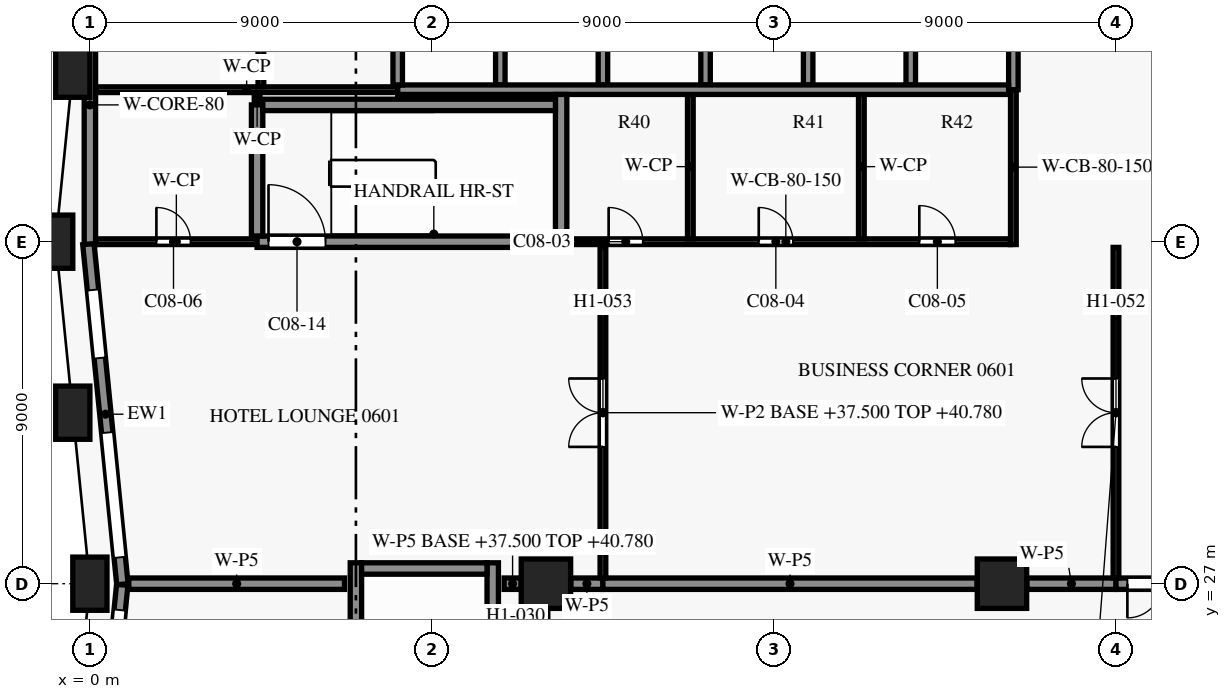
"""IFC4 building model, lengths in metres.
Left out: names, types, materials, properties, quantities, classifications, styles, units other than length and angle.
Written with IfcOpenShell. Run it as: python <this file> out.ifc"""

import sys

from ifc_helpers import new_model, si_unit, direction, frame, frame_2d, origin, origin_2d, place, context, subcontext, project, spatial, rectangle, extrude, element, fill, save


model = new_model("IFC4")
c1 = context("Model", 3, precision=1e-05, world=origin(), true_north=direction((0.0, 1.0)))
c2 = subcontext(c1, "Body", "Model", "MODEL_VIEW")
j1 = project(units=[si_unit("LENGTHUNIT", "METRE"), si_unit("PLANEANGLEUNIT", "RADIAN")], contexts=[c1])
p1 = place(None, origin())
s1 = spatial("IfcSite", under=j1, at=p1, CompositionType="ELEMENT")
p2 = place(p1, origin())
s2 = spatial("IfcBuilding", under=s1, at=p2, CompositionType="ELEMENT")
p3 = place(p2, frame((0.0, 0.0, 37.5)))
s3 = spatial("IfcBuildingStorey", under=s2, at=p3, CompositionType="ELEMENT", Elevation=37.5)
for number, where, z_axis, x_axis in (
    (1, (-0.45, 40.5, 0.0), (0.0, 0.0, 1.0), (-0.1, -0.995, 0.0)),
    (2, (-0.9, 36.0, 0.0), (0.0, 0.0, 1.0), (0.0, -1.0, 0.0)),
    (3, (-0.45, 31.5, 0.0), (0.0, 0.0, 1.0), (0.1, -0.995, 0.0)),
    (4, (0.0, 27.0, 0.0), (0.0, 0.0, 1.0), (0.0, -1.0, 0.0)),
):
    element("IfcColumn", number, at=place(p3, frame(where, z_axis=z_axis, x_axis=x_axis)), inside=s3, PredefinedType="COLUMN", context=c2, shape_type="SweptSolid", body=[
        extrude(rectangle(XDim=0.9, YDim=1.4, at=origin_2d()), origin(), (0.0, 0.0, 1.0), 3.6),
    ])
for number, where, z_axis, x_axis in (
    (5, (12.0, 27.0, 0.0), (0.0, 0.0, 1.0), (1.0, 0.0, 0.0)),
    (6, (24.0, 27.0, 0.0), (0.0, 0.0, 1.0), (1.0, 0.0, 0.0)),
):
    element("IfcColumn", number, at=place(p3, frame(where, z_axis=z_axis, x_axis=x_axis)), inside=s3, PredefinedType="COLUMN", context=c2, shape_type="SweptSolid", body=[
        extrude(rectangle(XDim=1.3, YDim=1.3, at=origin_2d()), origin(), (0.0, 0.0, 1.0), 3.6),
    ])
p4 = place(p3, frame((0.856, 26.985, 0.0), z_axis=(0.0, 0.0, 1.0), x_axis=(-0.099503719021, 0.99503719021, 0.0)))
e7 = element("IfcWall", 7, at=p4, inside=s3, PredefinedType="SOLIDWALL", context=c2, shape_type="SweptSolid", body=[
    extrude(rectangle(XDim=8.995, YDim=0.3, at=frame_2d((4.498, 0.0))), origin(), (0.0, 0.0, 1.0), 2.95),
])
p5 = place(p4, frame((0.711, 0.0, 0.15)))
e8 = element("IfcOpeningElement", 8, at=p5, cuts=e7, PredefinedType="OPENING", context=c2, shape_type="SweptSolid", body=[
    extrude(rectangle(XDim=3.3, YDim=2.4, at=frame_2d((1.65, 1.2))), frame((0.0, 0.16, 0.0), z_axis=(0.0, -1.0, 0.0), x_axis=(1.0, 0.0, 0.0)), (0.0, 0.0, 1.0), 0.32),
])
p6 = place(p4, frame((5.984, 0.0, 0.75)))
e9 = element("IfcOpeningElement", 9, at=p6, cuts=e7, PredefinedType="OPENING", context=c2, shape_type="SweptSolid", body=[
    extrude(rectangle(XDim=1.8, YDim=1.8, at=frame_2d((0.9, 0.9))), frame((0.0, 0.16, 0.0), z_axis=(0.0, -1.0, 0.0), x_axis=(1.0, 0.0, 0.0)), (0.0, 0.0, 1.0), 0.32),
])
p7 = place(p3, frame((-0.047, 17.985, 0.0), z_axis=(0.0, 0.0, 1.0), x_axis=(0.099522457379, 0.995035316196, 0.0)))
e10 = element("IfcWall", 10, at=p7, inside=s3, PredefinedType="SOLIDWALL", context=c2, shape_type="SweptSolid", body=[
    extrude(rectangle(XDim=9.03, YDim=0.3, at=frame_2d((4.515, 0.0))), origin(), (0.0, 0.0, 1.0), 2.95),
])
p8 = place(p7, frame((1.291, 0.0, 0.75)))
e11 = element("IfcOpeningElement", 11, at=p8, cuts=e10, PredefinedType="OPENING", context=c2, shape_type="SweptSolid", body=[
    extrude(rectangle(XDim=1.8, YDim=1.8, at=frame_2d((0.9, 0.9))), frame((0.0, 0.16, 0.0), z_axis=(0.0, -1.0, 0.0), x_axis=(1.0, 0.0, 0.0)), (0.0, 0.0, 1.0), 0.32),
])
p9 = place(p7, frame((5.064, 0.0, 0.15)))
e12 = element("IfcOpeningElement", 12, at=p9, cuts=e10, PredefinedType="OPENING", context=c2, shape_type="SweptSolid", body=[
    extrude(rectangle(XDim=3.3, YDim=2.4, at=frame_2d((1.65, 1.2))), frame((0.0, 0.16, 0.0), z_axis=(0.0, -1.0, 0.0), x_axis=(1.0, 0.0, 0.0)), (0.0, 0.0, 1.0), 0.32),
])
p10 = place(p3, frame((7.15, 27.4, 0.0), z_axis=(0.0, 0.0, 1.0), x_axis=(1.0, 0.0, 0.0)))
e13 = element("IfcWall", 13, at=p10, inside=s3, PredefinedType="SHEAR", context=c2, shape_type="SweptSolid", body=[
    extrude(rectangle(XDim=3.3, YDim=0.3, at=frame_2d((1.65, 0.0))), origin(), (0.0, 0.0, 1.0), 3.3),
])
p11 = place(p3, frame((0.15, 36.0, 0.0), z_axis=(0.0, 0.0, 1.0), x_axis=(1.0, 0.0, 0.0)))
e14 = element("IfcWall", 14, at=p11, inside=s3, PredefinedType="PARTITIONING", context=c2, shape_type="SweptSolid", body=[
    extrude(rectangle(XDim=4.25, YDim=0.15, at=frame_2d((2.125, 0.0))), origin(), (0.0, 0.0, 1.0), 3.3),
])
p12 = place(p11, frame((1.6, 0.0, 0.0)))
e15 = element("IfcOpeningElement", 15, at=p12, cuts=e14, PredefinedType="OPENING", context=c2, shape_type="SweptSolid", body=[
    extrude(rectangle(XDim=0.9, YDim=2.1, at=frame_2d((0.45, 1.05))), frame((0.0, 0.085, 0.0), z_axis=(0.0, -1.0, 0.0), x_axis=(1.0, 0.0, 0.0)), (0.0, 0.0, 1.0), 0.17),
])
p13 = place(p3, frame((12.4, 36.0, 0.0), z_axis=(0.0, 0.0, 1.0), x_axis=(1.0, 0.0, 0.0)))
e16 = element("IfcWall", 16, at=p13, inside=s3, PredefinedType="SHEAR", context=c2, shape_type="SweptSolid", body=[
    extrude(rectangle(XDim=11.825, YDim=0.15, at=frame_2d((5.913, 0.0))), origin(), (0.0, 0.0, 1.0), 3.3),
])
p14 = place(p13, frame((1.25, 0.0, 0.0)))
e17 = element("IfcOpeningElement", 17, at=p14, cuts=e16, PredefinedType="OPENING", context=c2, shape_type="SweptSolid", body=[
    extrude(rectangle(XDim=0.9, YDim=2.1, at=frame_2d((0.45, 1.05))), frame((0.0, 0.085, 0.0), z_axis=(0.0, -1.0, 0.0), x_axis=(1.0, 0.0, 0.0)), (0.0, 0.0, 1.0), 0.17),
])
p15 = place(p13, frame((5.2, 0.0, 0.0)))
e18 = element("IfcOpeningElement", 18, at=p15, cuts=e16, PredefinedType="OPENING", context=c2, shape_type="SweptSolid", body=[
    extrude(rectangle(XDim=0.9, YDim=2.1, at=frame_2d((0.45, 1.05))), frame((0.0, 0.085, 0.0), z_axis=(0.0, -1.0, 0.0), x_axis=(1.0, 0.0, 0.0)), (0.0, 0.0, 1.0), 0.17),
])
p16 = place(p13, frame((9.425, 0.0, 0.0)))
e19 = element("IfcOpeningElement", 19, at=p16, cuts=e16, PredefinedType="OPENING", context=c2, shape_type="SweptSolid", body=[
    extrude(rectangle(XDim=0.95, YDim=2.1, at=frame_2d((0.475, 1.05))), frame((0.0, 0.085, 0.0), z_axis=(0.0, -1.0, 0.0), x_axis=(1.0, 0.0, 0.0)), (0.0, 0.0, 1.0), 0.17),
])
p17 = place(p3, frame((4.4, 36.0, 0.0), z_axis=(0.0, 0.0, 1.0), x_axis=(1.0, 0.0, 0.0)))
e20 = element("IfcWall", 20, at=p17, inside=s3, PredefinedType="SHEAR", context=c2, shape_type="SweptSolid", body=[
    extrude(rectangle(XDim=8.0, YDim=0.3, at=frame_2d((4.0, 0.0))), origin(), (0.0, 0.0, 1.0), 3.3),
])
p18 = place(p17, frame((0.3, 0.0, 0.0)))
e21 = element("IfcOpeningElement", 21, at=p18, cuts=e20, PredefinedType="OPENING", context=c2, shape_type="SweptSolid", body=[
    extrude(rectangle(XDim=1.5, YDim=2.2, at=frame_2d((0.75, 1.1))), frame((0.0, 0.16, 0.0), z_axis=(0.0, -1.0, 0.0), x_axis=(1.0, 0.0, 0.0)), (0.0, 0.0, 1.0), 0.32),
])
p19 = place(p3, frame((4.55, 39.6, 0.0), z_axis=(0.0, 0.0, 1.0), x_axis=(1.0, 0.0, 0.0)))
e22 = element("IfcWall", 22, at=p19, inside=s3, PredefinedType="SHEAR", context=c2, shape_type="SweptSolid", body=[
    extrude(rectangle(XDim=7.7, YDim=0.3, at=frame_2d((3.85, 0.0))), origin(), (0.0, 0.0, 1.0), 3.3),
])
p20 = place(p3, frame((0.15, 40.0, 0.0), z_axis=(0.0, 0.0, 1.0), x_axis=(1.0, 0.0, 0.0)))
e23 = element("IfcWall", 23, at=p20, inside=s3, PredefinedType="PARTITIONING", context=c2, shape_type="SweptSolid", body=[
    extrude(rectangle(XDim=7.95, YDim=0.15, at=frame_2d((3.975, 0.0))), origin(), (0.0, 0.0, 1.0), 3.3),
])
p21 = place(p3, frame((8.1, 40.0, 0.0), z_axis=(0.0, 0.0, 1.0), x_axis=(1.0, 0.0, 0.0)))
e24 = element("IfcWall", 24, at=p21, inside=s3, PredefinedType="SHEAR", context=c2, shape_type="SweptSolid", body=[
    extrude(rectangle(XDim=16.075, YDim=0.25, at=frame_2d((8.038, 0.0))), origin(), (0.0, 0.0, 1.0), 3.3),
])
p22 = place(p3, frame((0.0, 35.925, 0.0), z_axis=(0.0, 0.0, 1.0), x_axis=(0.0, 1.0, 0.0)))
e25 = element("IfcWall", 25, at=p22, inside=s3, PredefinedType="SHEAR", context=c2, shape_type="SweptSolid", body=[
    extrude(rectangle(XDim=7.35, YDim=0.3, at=frame_2d((3.675, 0.0))), origin(), (0.0, 0.0, 1.0), 3.3),
])
p23 = place(p3, frame((4.4, 39.6, 0.0), z_axis=(0.0, 0.0, 1.0), x_axis=(0.0, 1.0, 0.0)))
e26 = element("IfcWall", 26, at=p23, inside=s3, PredefinedType="PARTITIONING", context=c2, shape_type="SweptSolid", body=[
    extrude(rectangle(XDim=0.325, YDim=0.15, at=frame_2d((0.163, 0.0))), origin(), (0.0, 0.0, 1.0), 3.3),
])
p24 = place(p3, frame((4.4, 36.15, 0.0), z_axis=(0.0, 0.0, 1.0), x_axis=(0.0, 1.0, 0.0)))
e27 = element("IfcWall", 27, at=p24, inside=s3, PredefinedType="SHEAR", context=c2, shape_type="SweptSolid", body=[
    extrude(rectangle(XDim=3.45, YDim=0.3, at=frame_2d((1.725, 0.0))), origin(), (0.0, 0.0, 1.0), 3.3),
])
p25 = place(p3, frame((4.5, 40.075, 0.0), z_axis=(0.0, 0.0, 1.0), x_axis=(0.0, 1.0, 0.0)))
e28 = element("IfcWall", 28, at=p25, inside=s3, PredefinedType="PARTITIONING", context=c2, shape_type="SweptSolid", body=[
    extrude(rectangle(XDim=3.05, YDim=0.15, at=frame_2d((1.525, 0.0))), origin(), (0.0, 0.0, 1.0), 3.3),
])
p26 = place(p3, frame((7.0, 19.25, 0.0), z_axis=(0.0, 0.0, 1.0), x_axis=(0.0, 1.0, 0.0)))
e29 = element("IfcWall", 29, at=p26, inside=s3, PredefinedType="SHEAR", context=c2, shape_type="SweptSolid", body=[
    extrude(rectangle(XDim=8.3, YDim=0.3, at=frame_2d((4.15, 0.0))), origin(), (0.0, 0.0, 1.0), 3.3),
])
p27 = place(p3, frame((8.1, 40.125, 0.0), z_axis=(0.0, 0.0, 1.0), x_axis=(0.0, 1.0, 0.0)))
e30 = element("IfcWall", 30, at=p27, inside=s3, PredefinedType="SHEAR", context=c2, shape_type="SweptSolid", body=[
    extrude(rectangle(XDim=2.95, YDim=0.25, at=frame_2d((1.475, 0.0))), origin(), (0.0, 0.0, 1.0), 3.3),
])
p28 = place(p3, frame((10.6, 19.25, 0.0), z_axis=(0.0, 0.0, 1.0), x_axis=(0.0, 1.0, 0.0)))
e31 = element("IfcWall", 31, at=p28, inside=s3, PredefinedType="SHEAR", context=c2, shape_type="SweptSolid", body=[
    extrude(rectangle(XDim=8.3, YDim=0.3, at=frame_2d((4.15, 0.0))), origin(), (0.0, 0.0, 1.0), 3.3),
])
p29 = place(p28, frame((0.55, 0.0, 0.0)))
e32 = element("IfcOpeningElement", 32, at=p29, cuts=e31, PredefinedType="OPENING", context=c2, shape_type="SweptSolid", body=[
    extrude(rectangle(XDim=1.2, YDim=2.2, at=frame_2d((0.6, 1.1))), frame((0.0, 0.16, 0.0), z_axis=(0.0, -1.0, 0.0), x_axis=(1.0, 0.0, 0.0)), (0.0, 0.0, 1.0), 0.32),
])
p30 = place(p3, frame((10.8, 40.125, 0.0), z_axis=(0.0, 0.0, 1.0), x_axis=(0.0, 1.0, 0.0)))
e33 = element("IfcWall", 33, at=p30, inside=s3, PredefinedType="SHEAR", context=c2, shape_type="SweptSolid", body=[
    extrude(rectangle(XDim=2.95, YDim=0.25, at=frame_2d((1.475, 0.0))), origin(), (0.0, 0.0, 1.0), 3.3),
])
p31 = place(p3, frame((12.4, 36.15, 0.0), z_axis=(0.0, 0.0, 1.0), x_axis=(0.0, 1.0, 0.0)))
e34 = element("IfcWall", 34, at=p31, inside=s3, PredefinedType="SHEAR", context=c2, shape_type="SweptSolid", body=[
    extrude(rectangle(XDim=3.725, YDim=0.3, at=frame_2d((1.863, 0.0))), origin(), (0.0, 0.0, 1.0), 3.3),
])
p32 = place(p3, frame((13.5, 40.125, 0.0), z_axis=(0.0, 0.0, 1.0), x_axis=(0.0, 1.0, 0.0)))
e35 = element("IfcWall", 35, at=p32, inside=s3, PredefinedType="SHEAR", context=c2, shape_type="SweptSolid", body=[
    extrude(rectangle(XDim=2.95, YDim=0.25, at=frame_2d((1.475, 0.0))), origin(), (0.0, 0.0, 1.0), 3.3),
])
p33 = place(p3, frame((15.8, 36.075, 0.0), z_axis=(0.0, 0.0, 1.0), x_axis=(0.0, 1.0, 0.0)))
e36 = element("IfcWall", 36, at=p33, inside=s3, PredefinedType="PARTITIONING", context=c2, shape_type="SweptSolid", body=[
    extrude(rectangle(XDim=3.8, YDim=0.15, at=frame_2d((1.9, 0.0))), origin(), (0.0, 0.0, 1.0), 3.3),
])
for number, where, z_axis, x_axis in (
    (37, (16.2, 40.125, 0.0), (0.0, 0.0, 1.0), (0.0, 1.0, 0.0)),
    (38, (18.9, 40.125, 0.0), (0.0, 0.0, 1.0), (0.0, 1.0, 0.0)),
):
    element("IfcWall", number, at=place(p3, frame(where, z_axis=z_axis, x_axis=x_axis)), inside=s3, PredefinedType="SHEAR", context=c2, shape_type="SweptSolid", body=[
        extrude(rectangle(XDim=2.95, YDim=0.25, at=frame_2d((1.475, 0.0))), origin(), (0.0, 0.0, 1.0), 3.3),
    ])
p34 = place(p3, frame((20.3, 36.075, 0.0), z_axis=(0.0, 0.0, 1.0), x_axis=(0.0, 1.0, 0.0)))
e39 = element("IfcWall", 39, at=p34, inside=s3, PredefinedType="PARTITIONING", context=c2, shape_type="SweptSolid", body=[
    extrude(rectangle(XDim=3.8, YDim=0.15, at=frame_2d((1.9, 0.0))), origin(), (0.0, 0.0, 1.0), 3.3),
])
p35 = place(p3, frame((21.6, 40.125, 0.0), z_axis=(0.0, 0.0, 1.0), x_axis=(0.0, 1.0, 0.0)))
e40 = element("IfcWall", 40, at=p35, inside=s3, PredefinedType="SHEAR", context=c2, shape_type="SweptSolid", body=[
    extrude(rectangle(XDim=2.95, YDim=0.25, at=frame_2d((1.475, 0.0))), origin(), (0.0, 0.0, 1.0), 3.3),
])
p36 = place(p3, frame((24.3, 35.925, 0.0), z_axis=(0.0, 0.0, 1.0), x_axis=(0.0, 1.0, 0.0)))
e41 = element("IfcWall", 41, at=p36, inside=s3, PredefinedType="SHEAR", context=c2, shape_type="SweptSolid", body=[
    extrude(rectangle(XDim=4.075, YDim=0.15, at=frame_2d((2.038, 0.0))), origin(), (0.0, 0.0, 1.0), 3.3),
])
p37 = place(p3, frame((24.3, 40.0, 0.0), z_axis=(0.0, 0.0, 1.0), x_axis=(0.0, 1.0, 0.0)))
e42 = element("IfcWall", 42, at=p37, inside=s3, PredefinedType="SHEAR", context=c2, shape_type="SweptSolid", body=[
    extrude(rectangle(XDim=3.325, YDim=0.25, at=frame_2d((1.663, 0.0))), origin(), (0.0, 0.0, 1.0), 3.3),
])
p38 = place(p3, frame((12.0, 26.345, 0.0), z_axis=(0.0, 0.0, 1.0), x_axis=(0.0, -1.0, 0.0)))
e43 = element("IfcWall", 43, at=p38, inside=s3, PredefinedType="PARTITIONING", context=c2, shape_type="SweptSolid", body=[
    extrude(rectangle(XDim=3.845, YDim=0.1, at=frame_2d((1.922, 0.0))), origin(), (0.0, 0.0, 1.0), 2.58),
])
p39 = place(p38, frame((1.145, 0.0, 0.0)))
e44 = element("IfcOpeningElement", 44, at=p39, cuts=e43, PredefinedType="OPENING", context=c2, shape_type="SweptSolid", body=[
    extrude(rectangle(XDim=0.9, YDim=2.1, at=frame_2d((0.45, 1.05))), frame((0.0, 0.06, 0.0), z_axis=(0.0, -1.0, 0.0), x_axis=(1.0, 0.0, 0.0)), (0.0, 0.0, 1.0), 0.12),
])
p40 = place(p3, frame((6.7, 27.0, 0.0), z_axis=(0.0, 0.0, 1.0), x_axis=(-1.0, 0.0, 0.0)))
e45 = element("IfcWall", 45, at=p40, inside=s3, PredefinedType="PARTITIONING", context=c2, shape_type="SweptSolid", body=[
    extrude(rectangle(XDim=5.675, YDim=0.3, at=frame_2d((2.837, 0.0))), origin(), (0.0, 0.0, 1.0), 2.58),
])
p41 = place(p3, frame((11.345, 27.0, 0.0), z_axis=(0.0, 0.0, 1.0), x_axis=(-1.0, 0.0, 0.0)))
e46 = element("IfcWall", 46, at=p41, inside=s3, PredefinedType="PARTITIONING", context=c2, shape_type="SweptSolid", body=[
    extrude(rectangle(XDim=0.445, YDim=0.3, at=frame_2d((0.223, 0.0))), origin(), (0.0, 0.0, 1.0), 3.28),
])
p42 = place(p3, frame((13.5, 27.0, 0.0), z_axis=(0.0, 0.0, 1.0), x_axis=(-1.0, 0.0, 0.0)))
e47 = element("IfcWall", 47, at=p42, inside=s3, PredefinedType="PARTITIONING", context=c2, shape_type="SweptSolid", body=[
    extrude(rectangle(XDim=0.845, YDim=0.3, at=frame_2d((0.422, 0.0))), origin(), (0.0, 0.0, 1.0), 2.58),
])
p43 = place(p3, frame((23.345, 27.0, 0.0), z_axis=(0.0, 0.0, 1.0), x_axis=(-1.0, 0.0, 0.0)))
e48 = element("IfcWall", 48, at=p43, inside=s3, PredefinedType="PARTITIONING", context=c2, shape_type="SweptSolid", body=[
    extrude(rectangle(XDim=9.845, YDim=0.3, at=frame_2d((4.922, 0.0))), origin(), (0.0, 0.0, 1.0), 2.58),
])
p44 = place(p3, frame((27.0, 27.0, 0.0), z_axis=(0.0, 0.0, 1.0), x_axis=(-1.0, 0.0, 0.0)))
e49 = element("IfcWall", 49, at=p44, inside=s3, PredefinedType="PARTITIONING", context=c2, shape_type="SweptSolid", body=[
    extrude(rectangle(XDim=2.345, YDim=0.3, at=frame_2d((1.172, 0.0))), origin(), (0.0, 0.0, 1.0), 2.58),
])
p45 = place(p3, frame((29.4, 27.0, 0.0), z_axis=(0.0, 0.0, 1.0), x_axis=(-1.0, 0.0, 0.0)))
e50 = element("IfcWall", 50, at=p45, inside=s3, PredefinedType="PARTITIONING", context=c2, shape_type="SweptSolid", body=[
    extrude(rectangle(XDim=2.4, YDim=0.3, at=frame_2d((1.2, 0.0))), origin(), (0.0, 0.0, 1.0), 2.58),
])
p46 = place(p45, frame((0.3, 0.0, 0.0)))
e51 = element("IfcOpeningElement", 51, at=p46, cuts=e50, PredefinedType="OPENING", context=c2, shape_type="SweptSolid", body=[
    extrude(rectangle(XDim=1.8, YDim=2.1, at=frame_2d((0.9, 1.05))), frame((0.0, 0.16, 0.0), z_axis=(0.0, -1.0, 0.0), x_axis=(1.0, 0.0, 0.0)), (0.0, 0.0, 1.0), 0.32),
])
p47 = place(p3, frame((27.0, 27.15, 0.0), z_axis=(0.0, 0.0, 1.0), x_axis=(0.0, 1.0, 0.0)))
e52 = element("IfcWall", 52, at=p47, inside=s3, PredefinedType="PARTITIONING", context=c2, shape_type="SweptSolid", body=[
    extrude(rectangle(XDim=8.7, YDim=0.15, at=frame_2d((4.35, 0.0))), origin(), (0.0, 0.0, 1.0), 3.28),
])
p48 = place(p47, frame((3.45, 0.0, 0.0)))
e53 = element("IfcOpeningElement", 53, at=p48, cuts=e52, PredefinedType="OPENING", context=c2, shape_type="SweptSolid", body=[
    extrude(rectangle(XDim=1.8, YDim=2.1, at=frame_2d((0.9, 1.05))), frame((0.0, 0.085, 0.0), z_axis=(0.0, -1.0, 0.0), x_axis=(1.0, 0.0, 0.0)), (0.0, 0.0, 1.0), 0.17),
])
p49 = place(p3, frame((13.5, 27.15, 0.0), z_axis=(0.0, 0.0, 1.0), x_axis=(0.0, 1.0, 0.0)))
e54 = element("IfcWall", 54, at=p49, inside=s3, PredefinedType="PARTITIONING", context=c2, shape_type="SweptSolid", body=[
    extrude(rectangle(XDim=8.7, YDim=0.15, at=frame_2d((4.35, 0.0))), origin(), (0.0, 0.0, 1.0), 3.28),
])
p50 = place(p49, frame((3.45, 0.0, 0.0)))
e55 = element("IfcOpeningElement", 55, at=p50, cuts=e54, PredefinedType="OPENING", context=c2, shape_type="SweptSolid", body=[
    extrude(rectangle(XDim=1.8, YDim=2.1, at=frame_2d((0.9, 1.05))), frame((0.0, 0.085, 0.0), z_axis=(0.0, -1.0, 0.0), x_axis=(1.0, 0.0, 0.0)), (0.0, 0.0, 1.0), 0.17),
])
p51 = place(p5, origin())
e56 = element("IfcWindow", 56, at=p51, inside=s3, PartitioningType="SINGLE_PANEL", PredefinedType="WINDOW", context=c2, shape_type="SweptSolid", body=[
    extrude(rectangle(XDim=3.3, YDim=2.4, at=frame_2d((1.65, 1.2))), frame((0.0, 0.03, 0.0), z_axis=(0.0, -1.0, 0.0), x_axis=(1.0, 0.0, 0.0)), (0.0, 0.0, 1.0), 0.06),
])
fill(e8, e56)
p52 = place(p6, origin())
e57 = element("IfcWindow", 57, at=p52, inside=s3, PartitioningType="SINGLE_PANEL", PredefinedType="WINDOW", context=c2, shape_type="SweptSolid", body=[
    extrude(rectangle(XDim=1.8, YDim=1.8, at=frame_2d((0.9, 0.9))), frame((0.0, 0.03, 0.0), z_axis=(0.0, -1.0, 0.0), x_axis=(1.0, 0.0, 0.0)), (0.0, 0.0, 1.0), 0.06),
])
fill(e9, e57)
p53 = place(p9, origin())
e58 = element("IfcWindow", 58, at=p53, inside=s3, PartitioningType="SINGLE_PANEL", PredefinedType="WINDOW", context=c2, shape_type="SweptSolid", body=[
    extrude(rectangle(XDim=3.3, YDim=2.4, at=frame_2d((1.65, 1.2))), frame((0.0, 0.03, 0.0), z_axis=(0.0, -1.0, 0.0), x_axis=(1.0, 0.0, 0.0)), (0.0, 0.0, 1.0), 0.06),
])
fill(e12, e58)
p54 = place(p14, origin())
e59 = element("IfcDoor", 59, at=p54, inside=s3, OperationType="SINGLE_SWING_RIGHT", PredefinedType="DOOR", context=c2, shape_type="SweptSolid", body=[
    extrude(rectangle(XDim=0.9, YDim=2.1, at=frame_2d((0.45, 1.05))), frame((0.0, 0.025, 0.0), z_axis=(0.0, -1.0, 0.0), x_axis=(1.0, 0.0, 0.0)), (0.0, 0.0, 1.0), 0.05),
])
fill(e17, e59)
p55 = place(p15, origin())
e60 = element("IfcDoor", 60, at=p55, inside=s3, OperationType="SINGLE_SWING_LEFT", PredefinedType="DOOR", context=c2, shape_type="SweptSolid", body=[
    extrude(rectangle(XDim=0.9, YDim=2.1, at=frame_2d((0.45, 1.05))), frame((0.0, 0.025, 0.0), z_axis=(0.0, -1.0, 0.0), x_axis=(1.0, 0.0, 0.0)), (0.0, 0.0, 1.0), 0.05),
])
fill(e18, e60)
p56 = place(p16, origin())
e61 = element("IfcDoor", 61, at=p56, inside=s3, OperationType="SINGLE_SWING_RIGHT", PredefinedType="DOOR", context=c2, shape_type="SweptSolid", body=[
    extrude(rectangle(XDim=0.95, YDim=2.1, at=frame_2d((0.475, 1.05))), frame((0.0, 0.025, 0.0), z_axis=(0.0, -1.0, 0.0), x_axis=(1.0, 0.0, 0.0)), (0.0, 0.0, 1.0), 0.05),
])
fill(e19, e61)
p57 = place(p12, origin())
e62 = element("IfcDoor", 62, at=p57, inside=s3, OperationType="SINGLE_SWING_LEFT", PredefinedType="DOOR", context=c2, shape_type="SweptSolid", body=[
    extrude(rectangle(XDim=0.9, YDim=2.1, at=frame_2d((0.45, 1.05))), frame((0.0, 0.025, 0.0), z_axis=(0.0, -1.0, 0.0), x_axis=(1.0, 0.0, 0.0)), (0.0, 0.0, 1.0), 0.05),
])
fill(e15, e62)
p58 = place(p18, origin())
e63 = element("IfcDoor", 63, at=p58, inside=s3, OperationType="SINGLE_SWING_RIGHT", PredefinedType="DOOR", context=c2, shape_type="SweptSolid", body=[
    extrude(rectangle(XDim=1.5, YDim=2.2, at=frame_2d((0.75, 1.1))), frame((0.0, 0.025, 0.0), z_axis=(0.0, -1.0, 0.0), x_axis=(1.0, 0.0, 0.0)), (0.0, 0.0, 1.0), 0.05),
])
fill(e21, e63)
p59 = place(p48, origin())
e64 = element("IfcDoor", 64, at=p59, inside=s3, OperationType="DOUBLE_DOOR_SINGLE_SWING", PredefinedType="DOOR", context=c2, shape_type="SweptSolid", body=[
    extrude(rectangle(XDim=1.8, YDim=2.1, at=frame_2d((0.9, 1.05))), frame((0.0, 0.025, 0.0), z_axis=(0.0, -1.0, 0.0), x_axis=(1.0, 0.0, 0.0)), (0.0, 0.0, 1.0), 0.05),
])
fill(e53, e64)
p60 = place(p50, origin())
e65 = element("IfcDoor", 65, at=p60, inside=s3, OperationType="DOUBLE_DOOR_SINGLE_SWING", PredefinedType="DOOR", context=c2, shape_type="SweptSolid", body=[
    extrude(rectangle(XDim=1.8, YDim=2.1, at=frame_2d((0.9, 1.05))), frame((0.0, 0.025, 0.0), z_axis=(0.0, -1.0, 0.0), x_axis=(1.0, 0.0, 0.0)), (0.0, 0.0, 1.0), 0.05),
])
fill(e55, e65)
p61 = place(p46, origin())
e66 = element("IfcDoor", 66, at=p61, inside=s3, OperationType="DOUBLE_DOOR_SINGLE_SWING", PredefinedType="DOOR", context=c2, shape_type="SweptSolid", body=[
    extrude(rectangle(XDim=1.8, YDim=2.1, at=frame_2d((0.9, 1.05))), frame((0.0, 0.025, 0.0), z_axis=(0.0, -1.0, 0.0), x_axis=(1.0, 0.0, 0.0)), (0.0, 0.0, 1.0), 0.05),
])
fill(e51, e66)
save(model, sys.argv[1])
